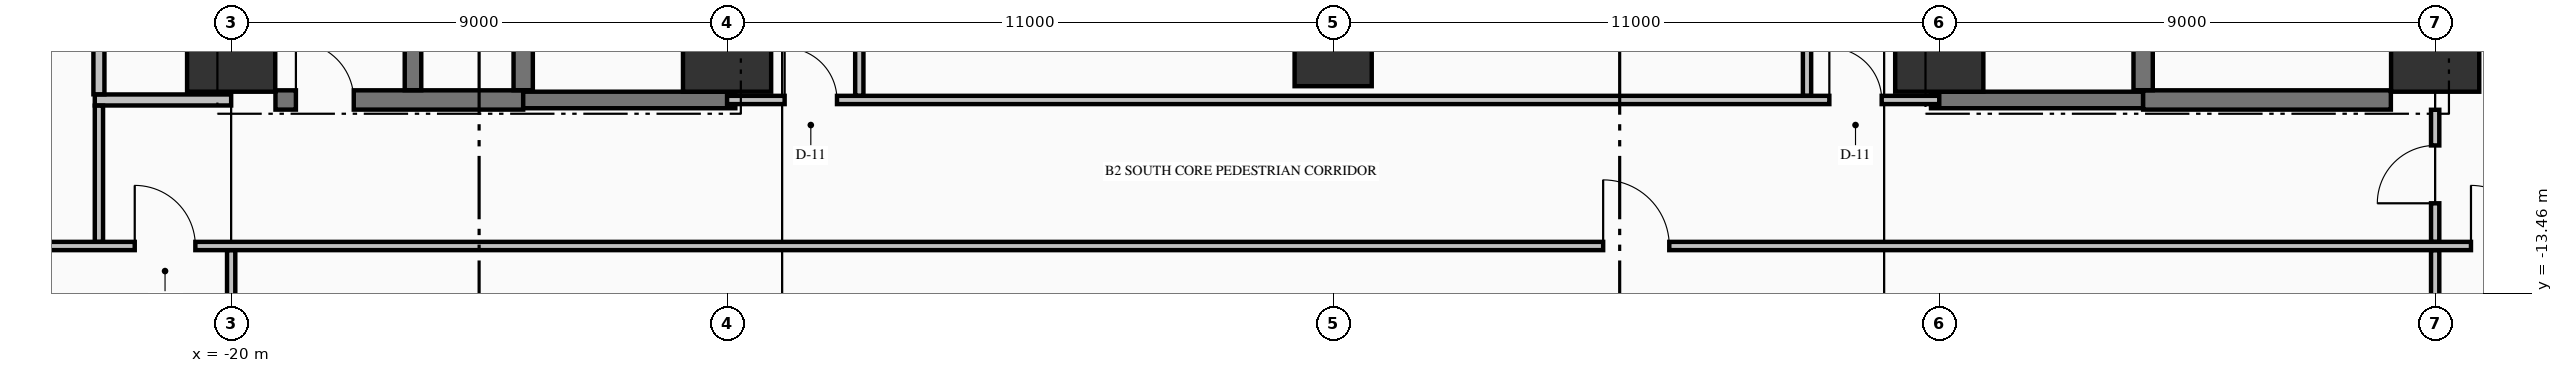
"""IFC4 building model, lengths in metres.
Left out: names, types, materials, properties, quantities, classifications, styles, units other than length and angle.
Written with IfcOpenShell. Run it as: python <this file> out.ifc"""

import sys

from ifc_helpers import new_model, si_unit, direction, frame, frame_2d, origin, origin_2d, place, context, subcontext, project, spatial, rectangle, extrude, element, fill, save


model = new_model("IFC4")
c1 = context("Model", 3, precision=1e-05, world=origin(), true_north=direction((0.0, 1.0)))
c2 = subcontext(c1, "Body", "Model", "MODEL_VIEW")
j1 = project(units=[si_unit("LENGTHUNIT", "METRE"), si_unit("PLANEANGLEUNIT", "RADIAN")], contexts=[c1])
p1 = place(None, origin())
s1 = spatial("IfcSite", under=j1, at=p1, CompositionType="ELEMENT")
p2 = place(p1, origin())
s2 = spatial("IfcBuilding", under=s1, at=p2, CompositionType="ELEMENT")
p3 = place(p2, frame((0.0, 0.0, -9.1)))
s3 = spatial("IfcBuildingStorey", under=s2, at=p3, CompositionType="ELEMENT", Elevation=-9.1)
for number, where, z_axis, x_axis in (
    (1, (-20.0, -9.0, -0.45), (0.0, 0.0, 1.0), (1.0, 0.0, 0.0)),
    (2, (-11.0, -9.0, -0.45), (0.0, 0.0, 1.0), (1.0, 0.0, 0.0)),
):
    element("IfcColumn", number, at=place(p3, frame(where, z_axis=z_axis, x_axis=x_axis)), inside=s3, PredefinedType="COLUMN", context=c2, shape_type="SweptSolid", body=[
        extrude(rectangle(XDim=1.6, YDim=1.6, at=origin_2d()), origin(), (0.0, 0.0, 1.0), 4.65),
    ])
p4 = place(p3, frame((0.0, -9.0, -0.45), z_axis=(0.0, 0.0, 1.0), x_axis=(1.0, 0.0, 0.0)))
e3 = element("IfcColumn", 3, at=p4, inside=s3, PredefinedType="COLUMN", context=c2, shape_type="SweptSolid", body=[
    extrude(rectangle(XDim=1.4, YDim=1.4, at=origin_2d()), origin(), (0.0, 0.0, 1.0), 4.65),
])
for number, where, z_axis, x_axis in (
    (4, (11.0, -9.0, -0.45), (0.0, 0.0, 1.0), (1.0, 0.0, 0.0)),
    (5, (20.0, -9.0, -0.45), (0.0, 0.0, 1.0), (1.0, 0.0, 0.0)),
):
    element("IfcColumn", number, at=place(p3, frame(where, z_axis=z_axis, x_axis=x_axis)), inside=s3, PredefinedType="COLUMN", context=c2, shape_type="SweptSolid", body=[
        extrude(rectangle(XDim=1.6, YDim=1.6, at=origin_2d()), origin(), (0.0, 0.0, 1.0), 4.65),
    ])
p5 = place(p3, frame((-19.196, -9.95, 0.0), z_axis=(0.0, 0.0, 1.0), x_axis=(1.0, 0.0, 0.0)))
e6 = element("IfcWall", 6, at=p5, inside=s3, PredefinedType="SHEAR", context=c2, shape_type="SweptSolid", body=[
    extrude(rectangle(XDim=4.496, YDim=0.35, at=frame_2d((2.248, 0.0))), origin(), (0.0, 0.0, 1.0), 4.2),
])
p6 = place(p5, frame((0.371, 0.0, 0.0)))
e7 = element("IfcOpeningElement", 7, at=p6, cuts=e6, PredefinedType="OPENING", context=c2, shape_type="SweptSolid", body=[
    extrude(rectangle(XDim=1.05, YDim=2.15, at=frame_2d((0.525, 1.075))), frame((0.0, 0.185, 0.0), z_axis=(0.0, -1.0, 0.0), x_axis=(1.0, 0.0, 0.0)), (0.0, 0.0, 1.0), 0.37),
])
for number, where, z_axis, x_axis in (
    (8, (-14.7, -9.95, 0.0), (0.0, 0.0, 1.0), (1.0, 0.0, 0.0)),
    (9, (10.85, -9.95, 0.0), (0.0, 0.0, 1.0), (1.0, 0.0, 0.0)),
):
    element("IfcWall", number, at=place(p3, frame(where, z_axis=z_axis, x_axis=x_axis)), inside=s3, PredefinedType="SHEAR", context=c2, shape_type="SweptSolid", body=[
        extrude(rectangle(XDim=3.85, YDim=0.3, at=frame_2d((1.925, 0.0))), origin(), (0.0, 0.0, 1.0), 4.2),
    ])
p7 = place(p3, frame((14.7, -9.95, 0.0), z_axis=(0.0, 0.0, 1.0), x_axis=(1.0, 0.0, 0.0)))
e10 = element("IfcWall", 10, at=p7, inside=s3, PredefinedType="SHEAR", context=c2, shape_type="SweptSolid", body=[
    extrude(rectangle(XDim=4.496, YDim=0.35, at=frame_2d((2.248, 0.0))), origin(), (0.0, 0.0, 1.0), 4.2),
])
p8 = place(p3, frame((-33.722, -12.6, 0.0), z_axis=(0.0, 0.0, 1.0), x_axis=(1.0, 0.0, 0.0)))
e11 = element("IfcWall", 11, at=p8, inside=s3, PredefinedType="PARTITIONING", context=c2, shape_type="SweptSolid", body=[
    extrude(rectangle(XDim=56.222, YDim=0.15, at=frame_2d((28.111, 0.0))), origin(), (0.0, 0.0, 1.0), 3.74),
])
p9 = place(p8, frame((11.972, 0.0, 0.0)))
e12 = element("IfcOpeningElement", 12, at=p9, cuts=e11, PredefinedType="OPENING", context=c2, shape_type="SweptSolid", body=[
    extrude(rectangle(XDim=1.1, YDim=2.15, at=frame_2d((0.55, 1.075))), frame((0.0, 0.085, 0.0), z_axis=(0.0, -1.0, 0.0), x_axis=(1.0, 0.0, 0.0)), (0.0, 0.0, 1.0), 0.17),
])
p10 = place(p8, frame((54.372, 0.0, 0.0)))
e13 = element("IfcOpeningElement", 13, at=p10, cuts=e11, PredefinedType="OPENING", context=c2, shape_type="SweptSolid", body=[
    extrude(rectangle(XDim=1.1, YDim=2.15, at=frame_2d((0.55, 1.075))), frame((0.0, 0.085, 0.0), z_axis=(0.0, -1.0, 0.0), x_axis=(1.0, 0.0, 0.0)), (0.0, 0.0, 1.0), 0.17),
])
p11 = place(p8, frame((38.622, 0.0, 0.0)))
e14 = element("IfcOpeningElement", 14, at=p11, cuts=e11, PredefinedType="OPENING", context=c2, shape_type="SweptSolid", body=[
    extrude(rectangle(XDim=1.2, YDim=2.15, at=frame_2d((0.6, 1.075))), frame((0.0, 0.085, 0.0), z_axis=(0.0, -1.0, 0.0), x_axis=(1.0, 0.0, 0.0)), (0.0, 0.0, 1.0), 0.17),
])
p12 = place(p3, frame((-22.475, -9.95, 0.0), z_axis=(0.0, 0.0, 1.0), x_axis=(1.0, 0.0, 0.0)))
e15 = element("IfcWall", 15, at=p12, inside=s3, PredefinedType="PARTITIONING", context=c2, shape_type="SweptSolid", body=[
    extrude(rectangle(XDim=2.475, YDim=0.2, at=frame_2d((1.238, 0.0))), origin(), (0.0, 0.0, 1.0), 4.2),
])
p13 = place(p3, frame((-11.0, -9.95, 0.0), z_axis=(0.0, 0.0, 1.0), x_axis=(1.0, 0.0, 0.0)))
e16 = element("IfcWall", 16, at=p13, inside=s3, PredefinedType="PARTITIONING", context=c2, shape_type="SweptSolid", body=[
    extrude(rectangle(XDim=22.0, YDim=0.15, at=frame_2d((11.0, 0.0))), origin(), (0.0, 0.0, 1.0), 4.2),
])
p14 = place(p13, frame((1.045, 0.0, 0.0)))
e17 = element("IfcOpeningElement", 17, at=p14, cuts=e16, PredefinedType="OPENING", context=c2, shape_type="SweptSolid", body=[
    extrude(rectangle(XDim=0.95, YDim=2.15, at=frame_2d((0.475, 1.075))), frame((0.0, 0.085, 0.0), z_axis=(0.0, -1.0, 0.0), x_axis=(1.0, 0.0, 0.0)), (0.0, 0.0, 1.0), 0.17),
])
p15 = place(p13, frame((20.005, 0.0, 0.0)))
e18 = element("IfcOpeningElement", 18, at=p15, cuts=e16, PredefinedType="OPENING", context=c2, shape_type="SweptSolid", body=[
    extrude(rectangle(XDim=0.95, YDim=2.15, at=frame_2d((0.475, 1.075))), frame((0.0, 0.085, 0.0), z_axis=(0.0, -1.0, 0.0), x_axis=(1.0, 0.0, 0.0)), (0.0, 0.0, 1.0), 0.17),
])
p16 = place(p3, frame((-16.7, -9.773, 0.0), z_axis=(0.0, 0.0, 1.0), x_axis=(0.0, 1.0, 0.0)))
e19 = element("IfcWall", 19, at=p16, inside=s3, PredefinedType="SHEAR", context=c2, shape_type="SweptSolid", body=[
    extrude(rectangle(XDim=9.371, YDim=0.3, at=frame_2d((4.686, 0.0))), origin(), (0.0, 0.0, 1.0), 4.2),
])
for number, where, z_axis, x_axis in (
    (20, (-14.7, -9.773, 0.0), (0.0, 0.0, 1.0), (0.0, 1.0, 0.0)),
    (21, (14.7, -9.773, 0.0), (0.0, 0.0, 1.0), (0.0, 1.0, 0.0)),
):
    element("IfcWall", number, at=place(p3, frame(where, z_axis=z_axis, x_axis=x_axis)), inside=s3, PredefinedType="SHEAR", context=c2, shape_type="SweptSolid", body=[
        extrude(rectangle(XDim=9.371, YDim=0.35, at=frame_2d((4.686, 0.0))), origin(), (0.0, 0.0, 1.0), 4.2),
    ])
p17 = place(p3, frame((-22.4, -12.522, 0.0), z_axis=(0.0, 0.0, 1.0), x_axis=(0.0, 1.0, 0.0)))
e22 = element("IfcWall", 22, at=p17, inside=s3, PredefinedType="PARTITIONING", context=c2, shape_type="SweptSolid", body=[
    extrude(rectangle(XDim=2.469, YDim=0.15, at=frame_2d((1.234, 0.0))), origin(), (0.0, 0.0, 1.0), 4.2),
])
p18 = place(p3, frame((-22.4, -9.847, 0.0), z_axis=(0.0, 0.0, 1.0), x_axis=(0.0, 1.0, 0.0)))
e23 = element("IfcWall", 23, at=p18, inside=s3, PredefinedType="PARTITIONING", context=c2, shape_type="SweptSolid", body=[
    extrude(rectangle(XDim=0.894, YDim=0.2, at=frame_2d((0.447, 0.0))), origin(), (0.0, 0.0, 1.0), 4.2),
])
p19 = place(p3, frame((-20.0, -15.194, 0.0), z_axis=(0.0, 0.0, 1.0), x_axis=(0.0, 1.0, 0.0)))
e24 = element("IfcWall", 24, at=p19, inside=s3, PredefinedType="PARTITIONING", context=c2, shape_type="SweptSolid", body=[
    extrude(rectangle(XDim=2.516, YDim=0.15, at=frame_2d((1.258, 0.0))), origin(), (0.0, 0.0, 1.0), 4.2),
])
for number, where, z_axis, x_axis in (
    (25, (-8.6, -9.872, 0.0), (0.0, 0.0, 1.0), (0.0, 1.0, 0.0)),
    (26, (8.6, -9.872, 0.0), (0.0, 0.0, 1.0), (0.0, 1.0, 0.0)),
):
    element("IfcWall", number, at=place(p3, frame(where, z_axis=z_axis, x_axis=x_axis)), inside=s3, PredefinedType="PARTITIONING", context=c2, shape_type="SweptSolid", body=[
        extrude(rectangle(XDim=9.266, YDim=0.15, at=frame_2d((4.633, 0.0))), origin(), (0.0, 0.0, 1.0), 4.2),
    ])
p20 = place(p3, frame((20.0, -15.194, 0.0), z_axis=(0.0, 0.0, 1.0), x_axis=(0.0, 1.0, 0.0)))
e27 = element("IfcWall", 27, at=p20, inside=s3, PredefinedType="PARTITIONING", context=c2, shape_type="SweptSolid", body=[
    extrude(rectangle(XDim=2.516, YDim=0.15, at=frame_2d((1.258, 0.0))), origin(), (0.0, 0.0, 1.0), 3.242),
])
p21 = place(p3, frame((20.0, -12.522, 0.0), z_axis=(0.0, 0.0, 1.0), x_axis=(0.0, 1.0, 0.0)))
e28 = element("IfcWall", 28, at=p21, inside=s3, PredefinedType="PARTITIONING", context=c2, shape_type="SweptSolid", body=[
    extrude(rectangle(XDim=2.394, YDim=0.15, at=frame_2d((1.197, 0.0))), origin(), (0.0, 0.0, 1.0), 3.242),
])
p22 = place(p21, frame((0.697, 0.0, 0.0)))
e29 = element("IfcOpeningElement", 29, at=p22, cuts=e28, PredefinedType="OPENING", context=c2, shape_type="SweptSolid", body=[
    extrude(rectangle(XDim=1.05, YDim=2.15, at=frame_2d((0.525, 1.075))), frame((0.0, 0.085, 0.0), z_axis=(0.0, -1.0, 0.0), x_axis=(1.0, 0.0, 0.0)), (0.0, 0.0, 1.0), 0.17),
])
p23 = place(p6, origin())
e30 = element("IfcDoor", 30, at=p23, inside=s3, OperationType="SINGLE_SWING_LEFT", PredefinedType="DOOR", context=c2, shape_type="SweptSolid", body=[
    extrude(rectangle(XDim=1.05, YDim=2.15, at=frame_2d((0.525, 1.075))), frame((0.0, 0.025, 0.0), z_axis=(0.0, -1.0, 0.0), x_axis=(1.0, 0.0, 0.0)), (0.0, 0.0, 1.0), 0.05),
])
fill(e7, e30)
p24 = place(p14, origin())
e31 = element("IfcDoor", 31, at=p24, inside=s3, OperationType="SINGLE_SWING_LEFT", PredefinedType="DOOR", context=c2, shape_type="SweptSolid", body=[
    extrude(rectangle(XDim=0.95, YDim=2.15, at=frame_2d((0.475, 1.075))), frame((0.0, 0.025, 0.0), z_axis=(0.0, -1.0, 0.0), x_axis=(1.0, 0.0, 0.0)), (0.0, 0.0, 1.0), 0.05),
])
fill(e17, e31)
p25 = place(p15, origin())
e32 = element("IfcDoor", 32, at=p25, inside=s3, OperationType="SINGLE_SWING_LEFT", PredefinedType="DOOR", context=c2, shape_type="SweptSolid", body=[
    extrude(rectangle(XDim=0.95, YDim=2.15, at=frame_2d((0.475, 1.075))), frame((0.0, 0.025, 0.0), z_axis=(0.0, -1.0, 0.0), x_axis=(1.0, 0.0, 0.0)), (0.0, 0.0, 1.0), 0.05),
])
fill(e18, e32)
p26 = place(p9, origin())
e33 = element("IfcDoor", 33, at=p26, inside=s3, OperationType="SINGLE_SWING_LEFT", PredefinedType="DOOR", context=c2, shape_type="SweptSolid", body=[
    extrude(rectangle(XDim=1.1, YDim=2.15, at=frame_2d((0.55, 1.075))), frame((0.0, 0.025, 0.0), z_axis=(0.0, -1.0, 0.0), x_axis=(1.0, 0.0, 0.0)), (0.0, 0.0, 1.0), 0.05),
])
fill(e12, e33)
p27 = place(p22, origin())
e34 = element("IfcDoor", 34, at=p27, inside=s3, OperationType="SINGLE_SWING_LEFT", PredefinedType="DOOR", context=c2, shape_type="SweptSolid", body=[
    extrude(rectangle(XDim=1.05, YDim=2.15, at=frame_2d((0.525, 1.075))), frame((0.0, 0.025, 0.0), z_axis=(0.0, -1.0, 0.0), x_axis=(1.0, 0.0, 0.0)), (0.0, 0.0, 1.0), 0.05),
])
fill(e29, e34)
p28 = place(p10, origin())
e35 = element("IfcDoor", 35, at=p28, inside=s3, OperationType="SINGLE_SWING_LEFT", PredefinedType="DOOR", context=c2, shape_type="SweptSolid", body=[
    extrude(rectangle(XDim=1.1, YDim=2.15, at=frame_2d((0.55, 1.075))), frame((0.0, 0.025, 0.0), z_axis=(0.0, -1.0, 0.0), x_axis=(1.0, 0.0, 0.0)), (0.0, 0.0, 1.0), 0.05),
])
fill(e13, e35)
p29 = place(p11, origin())
e36 = element("IfcDoor", 36, at=p29, inside=s3, OperationType="SINGLE_SWING_LEFT", PredefinedType="DOOR", context=c2, shape_type="SweptSolid", body=[
    extrude(rectangle(XDim=1.2, YDim=2.15, at=frame_2d((0.6, 1.075))), frame((0.0, 0.025, 0.0), z_axis=(0.0, -1.0, 0.0), x_axis=(1.0, 0.0, 0.0)), (0.0, 0.0, 1.0), 0.05),
])
fill(e14, e36)
save(model, sys.argv[1])
